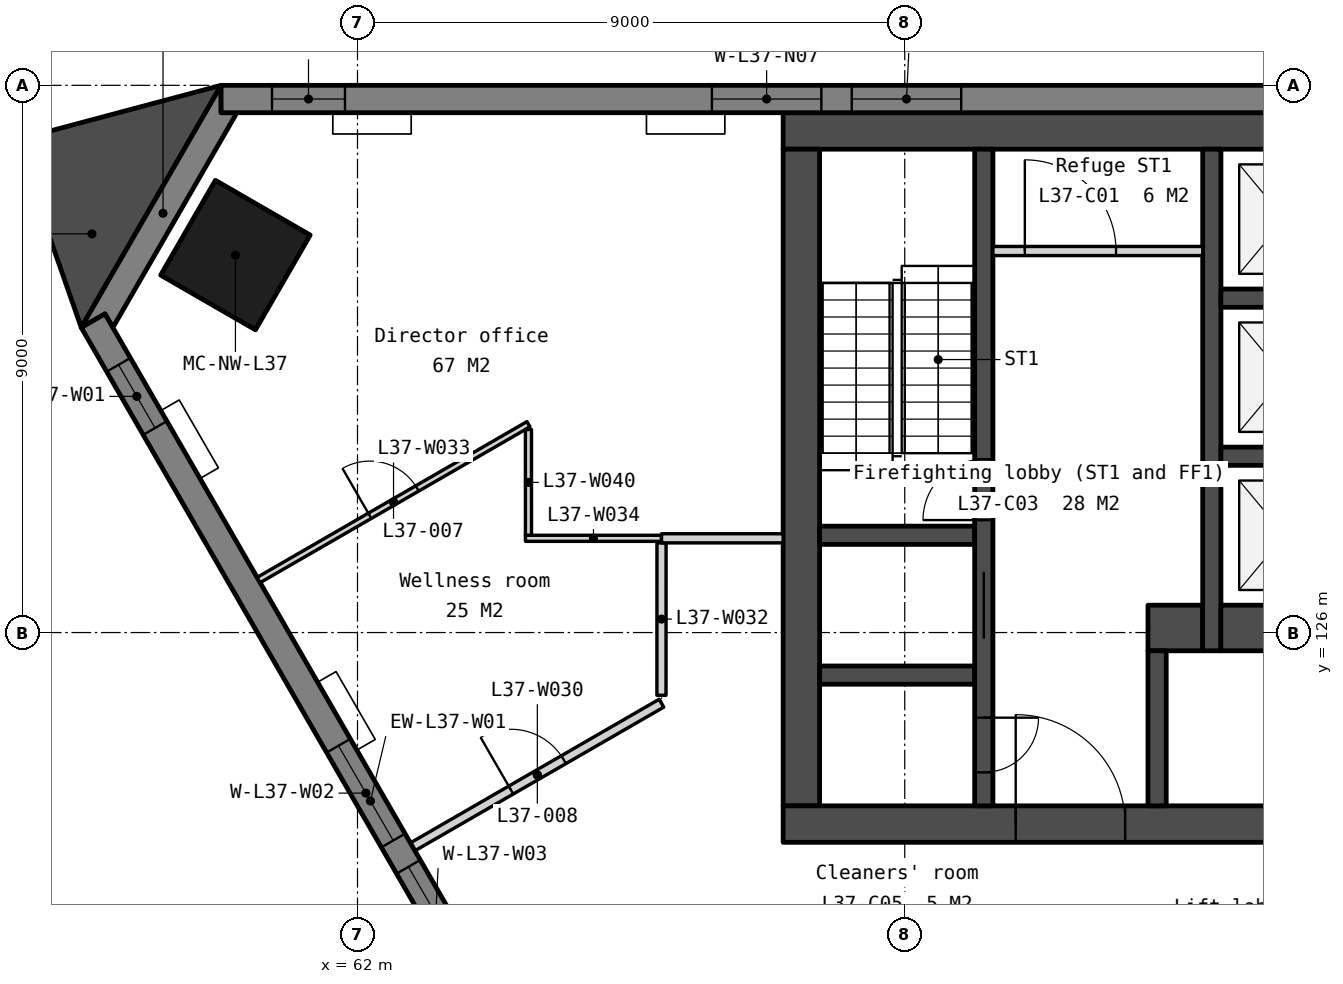
"""IFC4 building model, lengths in metres.
Left out: names, types, materials, properties, quantities, classifications, styles, units other than length and angle.
Written with IfcOpenShell. Run it as: python <this file> out.ifc"""

import sys

from ifc_helpers import new_model, si_unit, direction, frame, frame_2d, origin, origin_2d, place, context, subcontext, project, spatial, polyline, rectangle, outline, extrude, element, fill, save


model = new_model("IFC4")
c1 = context("Model", 3, precision=1e-05, world=origin(), true_north=direction((0.0, 1.0)))
c2 = subcontext(c1, "Body", "Model", "MODEL_VIEW")
j1 = project(units=[si_unit("LENGTHUNIT", "METRE"), si_unit("PLANEANGLEUNIT", "RADIAN")], contexts=[c1])
p1 = place(None, origin())
s1 = spatial("IfcSite", under=j1, at=p1, CompositionType="ELEMENT")
p2 = place(p1, origin())
s2 = spatial("IfcBuilding", under=s1, at=p2, CompositionType="ELEMENT")
p3 = place(p2, frame((0.0, 0.0, 148.1)))
s3 = spatial("IfcBuildingStorey", under=s2, at=p3, CompositionType="ELEMENT", Elevation=148.1)
p4 = place(p3, frame((59.993, 132.208, 0.0), z_axis=(0.0, 0.0, 1.0), x_axis=(-0.5, -0.866025403784, 0.0)))
e1 = element("IfcColumn", 1, at=p4, inside=s3, PredefinedType="COLUMN", context=c2, shape_type="SweptSolid", body=[
    extrude(rectangle(XDim=1.8, YDim=1.8, at=origin_2d()), origin(), (0.0, 0.0, 1.0), 3.9),
])
p5 = place(p3, frame((69.0, 134.25, 0.0), z_axis=(0.0, 0.0, 1.0), x_axis=(1.0, 0.0, 0.0)))
e2 = element("IfcWall", 2, at=p5, inside=s3, PredefinedType="SOLIDWALL", context=c2, shape_type="SweptSolid", body=[
    extrude(rectangle(XDim=22.0, YDim=0.6, at=frame_2d((11.0, 0.0))), origin(), (0.0, 0.0, 1.0), 3.75),
])
p6 = place(p3, frame((69.3, 133.95, 0.0), z_axis=(0.0, 0.0, 1.0), x_axis=(0.0, -1.0, 0.0)))
e3 = element("IfcWall", 3, at=p6, inside=s3, PredefinedType="SOLIDWALL", context=c2, shape_type="SweptSolid", body=[
    extrude(rectangle(XDim=10.8, YDim=0.6, at=frame_2d((5.4, 0.0))), origin(), (0.0, 0.0, 1.0), 3.75),
])
p7 = place(p3, frame((69.0, 122.85, 0.0), z_axis=(0.0, 0.0, 1.0), x_axis=(1.0, 0.0, 0.0)))
e4 = element("IfcWall", 4, at=p7, inside=s3, PredefinedType="SOLIDWALL", context=c2, shape_type="SweptSolid", body=[
    extrude(rectangle(XDim=22.0, YDim=0.6, at=frame_2d((11.0, 0.0))), origin(), (0.0, 0.0, 1.0), 3.75),
])
p8 = place(p7, frame((16.375, 0.0, 0.0)))
e5 = element("IfcOpeningElement", 5, at=p8, cuts=e4, PredefinedType="OPENING", context=c2, shape_type="SweptSolid", body=[
    extrude(rectangle(XDim=1.8, YDim=2.1, at=frame_2d((0.9, 1.05))), frame((0.0, 0.31, 0.0), z_axis=(0.0, -1.0, 0.0), x_axis=(1.0, 0.0, 0.0)), (0.0, 0.0, 1.0), 0.62),
])
p9 = place(p7, frame((3.825, 0.0, 0.0)))
e6 = element("IfcOpeningElement", 6, at=p9, cuts=e4, PredefinedType="OPENING", context=c2, shape_type="SweptSolid", body=[
    extrude(rectangle(XDim=1.8, YDim=2.1, at=frame_2d((0.9, 1.05))), frame((0.0, 0.31, 0.0), z_axis=(0.0, -1.0, 0.0), x_axis=(1.0, 0.0, 0.0)), (0.0, 0.0, 1.0), 0.62),
])
p10 = place(p7, frame((12.85, 0.0, 0.0)))
e7 = element("IfcOpeningElement", 7, at=p10, cuts=e4, PredefinedType="OPENING", context=c2, shape_type="SweptSolid", body=[
    extrude(rectangle(XDim=1.5, YDim=2.1, at=frame_2d((0.75, 1.05))), frame((0.0, 0.31, 0.0), z_axis=(0.0, -1.0, 0.0), x_axis=(1.0, 0.0, 0.0)), (0.0, 0.0, 1.0), 0.62),
])
for number, where, z_axis, x_axis in (
    (8, (69.6, 127.6, 0.0), (0.0, 0.0, 1.0), (1.0, 0.0, 0.0)),
    (9, (69.6, 125.3, 0.0), (0.0, 0.0, 1.0), (1.0, 0.0, 0.0)),
):
    element("IfcWall", number, at=place(p3, frame(where, z_axis=z_axis, x_axis=x_axis)), inside=s3, PredefinedType="SOLIDWALL", context=c2, shape_type="SweptSolid", body=[
        extrude(rectangle(XDim=2.55, YDim=0.3, at=frame_2d((1.275, 0.0))), origin(), (0.0, 0.0, 1.0), 3.75),
    ])
p11 = place(p3, frame((72.3, 133.95, 0.0), z_axis=(0.0, 0.0, 1.0), x_axis=(0.0, -1.0, 0.0)))
e10 = element("IfcWall", 10, at=p11, inside=s3, PredefinedType="SOLIDWALL", context=c2, shape_type="SweptSolid", body=[
    extrude(rectangle(XDim=10.8, YDim=0.3, at=frame_2d((5.4, 0.0))), origin(), (0.0, 0.0, 1.0), 3.75),
])
p12 = place(p11, frame((6.95, 0.0, 0.0)))
e11 = element("IfcOpeningElement", 11, at=p12, cuts=e10, PredefinedType="OPENING", context=c2, shape_type="SweptSolid", body=[
    extrude(rectangle(XDim=1.1, YDim=2.1, at=frame_2d((0.55, 1.05))), frame((0.0, 0.16, 0.0), z_axis=(0.0, -1.0, 0.0), x_axis=(1.0, 0.0, 0.0)), (0.0, 0.0, 1.0), 0.32),
])
p13 = place(p11, frame((9.35, 0.0, 0.0)))
e12 = element("IfcOpeningElement", 12, at=p13, cuts=e10, PredefinedType="OPENING", context=c2, shape_type="SweptSolid", body=[
    extrude(rectangle(XDim=0.9, YDim=2.1, at=frame_2d((0.45, 1.05))), frame((0.0, 0.16, 0.0), z_axis=(0.0, -1.0, 0.0), x_axis=(1.0, 0.0, 0.0)), (0.0, 0.0, 1.0), 0.32),
])
p14 = place(p11, frame((5.1, 0.0, 0.0)))
e13 = element("IfcOpeningElement", 13, at=p14, cuts=e10, PredefinedType="OPENING", context=c2, shape_type="SweptSolid", body=[
    extrude(rectangle(XDim=1.0, YDim=2.1, at=frame_2d((0.5, 1.05))), frame((0.0, 0.16, 0.0), z_axis=(0.0, -1.0, 0.0), x_axis=(1.0, 0.0, 0.0)), (0.0, 0.0, 1.0), 0.32),
])
p15 = place(p3, frame((72.45, 132.275, 0.0), z_axis=(0.0, 0.0, 1.0), x_axis=(1.0, 0.0, 0.0)))
e14 = element("IfcWall", 14, at=p15, inside=s3, PredefinedType="PARTITIONING", context=c2, shape_type="SweptSolid", body=[
    extrude(rectangle(XDim=3.45, YDim=0.15, at=frame_2d((1.725, 0.0))), origin(), (0.0, 0.0, 1.0), 3.75),
])
p16 = place(p15, frame((0.525, 0.0, 0.0)))
e15 = element("IfcOpeningElement", 15, at=p16, cuts=e14, PredefinedType="OPENING", context=c2, shape_type="SweptSolid", body=[
    extrude(rectangle(XDim=1.5, YDim=2.1, at=frame_2d((0.75, 1.05))), frame((0.0, 0.085, 0.0), z_axis=(0.0, -1.0, 0.0), x_axis=(1.0, 0.0, 0.0)), (0.0, 0.0, 1.0), 0.17),
])
p17 = place(p3, frame((75.0, 126.075, 0.0), z_axis=(0.0, 0.0, 1.0), x_axis=(1.0, 0.0, 0.0)))
e16 = element("IfcWall", 16, at=p17, inside=s3, PredefinedType="SOLIDWALL", context=c2, shape_type="SweptSolid", body=[
    extrude(rectangle(XDim=0.9, YDim=0.75, at=frame_2d((0.45, 0.0))), origin(), (0.0, 0.0, 1.0), 3.75),
])
p18 = place(p3, frame((75.15, 125.7, 0.0), z_axis=(0.0, 0.0, 1.0), x_axis=(0.0, -1.0, 0.0)))
e17 = element("IfcWall", 17, at=p18, inside=s3, PredefinedType="SOLIDWALL", context=c2, shape_type="SweptSolid", body=[
    extrude(rectangle(XDim=2.55, YDim=0.3, at=frame_2d((1.275, 0.0))), origin(), (0.0, 0.0, 1.0), 3.75),
])
p19 = place(p3, frame((76.05, 133.95, 0.0), z_axis=(0.0, 0.0, 1.0), x_axis=(0.0, -1.0, 0.0)))
e18 = element("IfcWall", 18, at=p19, inside=s3, PredefinedType="SOLIDWALL", context=c2, shape_type="SweptSolid", body=[
    extrude(rectangle(XDim=8.25, YDim=0.3, at=frame_2d((4.125, 0.0))), origin(), (0.0, 0.0, 1.0), 3.75),
])
for number, where, z_axis, x_axis in (
    (19, (76.2, 131.5, 0.0), (0.0, 0.0, 1.0), (1.0, 0.0, 0.0)),
    (20, (76.2, 128.9, 0.0), (0.0, 0.0, 1.0), (1.0, 0.0, 0.0)),
):
    element("IfcWall", number, at=place(p3, frame(where, z_axis=z_axis, x_axis=x_axis)), inside=s3, PredefinedType="SOLIDWALL", context=c2, shape_type="SweptSolid", body=[
        extrude(rectangle(XDim=2.1, YDim=0.3, at=frame_2d((1.05, 0.0))), origin(), (0.0, 0.0, 1.0), 3.75),
    ])
p20 = place(p3, frame((76.2, 126.075, 0.0), z_axis=(0.0, 0.0, 1.0), x_axis=(1.0, 0.0, 0.0)))
e21 = element("IfcWall", 21, at=p20, inside=s3, PredefinedType="SOLIDWALL", context=c2, shape_type="SweptSolid", body=[
    extrude(rectangle(XDim=2.1, YDim=0.75, at=frame_2d((1.05, 0.0))), origin(), (0.0, 0.0, 1.0), 3.75),
])
p21 = place(p3, frame((0.0, 0.0, -0.15)))
e22 = element("IfcWall", 22, at=p21, inside=s3, PredefinedType="SOLIDWALL", context=c2, shape_type="SweptSolid", body=[
    extrude(outline(polyline([(59.757, 135.0), (59.757, 134.55), (60.017, 134.55), (57.977, 131.016), (57.847, 131.241), (57.457, 131.016), (59.757, 135.0)])), origin(), (0.0, 0.0, 1.0), 3.9),
])
p22 = place(p3, frame((100.243, 134.775, -0.15), z_axis=(0.0, 0.0, 1.0), x_axis=(-1.0, 0.0, 0.0)))
e23 = element("IfcWall", 23, at=p22, inside=s3, PredefinedType="SOLIDWALL", context=c2, shape_type="SweptSolid", body=[
    extrude(outline(polyline([(40.486, 0.0), (40.486, 3.9), (0.0, 3.9), (0.0, 0.0), (40.486, 0.0)])), frame((0.0, 0.225, 0.0), z_axis=(0.0, -1.0, 0.0), x_axis=(1.0, 0.0, 0.0)), (0.0, 0.0, 1.0), 0.45),
])
p23 = place(p22, frame((0.837, 0.0, 0.95)))
e24 = element("IfcOpeningElement", 24, at=p23, cuts=e23, PredefinedType="OPENING", context=c2, shape_type="SweptSolid", body=[
    extrude(rectangle(XDim=1.2, YDim=2.2, at=frame_2d((0.6, 1.1))), frame((0.0, 0.235, 0.0), z_axis=(0.0, -1.0, 0.0), x_axis=(1.0, 0.0, 0.0)), (0.0, 0.0, 1.0), 0.47),
])
p24 = place(p22, frame((8.072, 0.0, 0.95)))
e25 = element("IfcOpeningElement", 25, at=p24, cuts=e23, PredefinedType="OPENING", context=c2, shape_type="SweptSolid", body=[
    extrude(rectangle(XDim=1.8, YDim=2.2, at=frame_2d((0.9, 1.1))), frame((0.0, 0.235, 0.0), z_axis=(0.0, -1.0, 0.0), x_axis=(1.0, 0.0, 0.0)), (0.0, 0.0, 1.0), 0.47),
])
p25 = place(p22, frame((10.372, 0.0, 0.95)))
e26 = element("IfcOpeningElement", 26, at=p25, cuts=e23, PredefinedType="OPENING", context=c2, shape_type="SweptSolid", body=[
    extrude(rectangle(XDim=1.8, YDim=2.2, at=frame_2d((0.9, 1.1))), frame((0.0, 0.235, 0.0), z_axis=(0.0, -1.0, 0.0), x_axis=(1.0, 0.0, 0.0)), (0.0, 0.0, 1.0), 0.47),
])
p26 = place(p22, frame((18.193, 0.0, 0.95)))
e27 = element("IfcOpeningElement", 27, at=p26, cuts=e23, PredefinedType="OPENING", context=c2, shape_type="SweptSolid", body=[
    extrude(rectangle(XDim=1.8, YDim=2.2, at=frame_2d((0.9, 1.1))), frame((0.0, 0.235, 0.0), z_axis=(0.0, -1.0, 0.0), x_axis=(1.0, 0.0, 0.0)), (0.0, 0.0, 1.0), 0.47),
])
p27 = place(p22, frame((20.493, 0.0, 0.95)))
e28 = element("IfcOpeningElement", 28, at=p27, cuts=e23, PredefinedType="OPENING", context=c2, shape_type="SweptSolid", body=[
    extrude(rectangle(XDim=1.8, YDim=2.2, at=frame_2d((0.9, 1.1))), frame((0.0, 0.235, 0.0), z_axis=(0.0, -1.0, 0.0), x_axis=(1.0, 0.0, 0.0)), (0.0, 0.0, 1.0), 0.47),
])
p28 = place(p22, frame((28.315, 0.0, 0.95)))
e29 = element("IfcOpeningElement", 29, at=p28, cuts=e23, PredefinedType="OPENING", context=c2, shape_type="SweptSolid", body=[
    extrude(rectangle(XDim=1.8, YDim=2.2, at=frame_2d((0.9, 1.1))), frame((0.0, 0.235, 0.0), z_axis=(0.0, -1.0, 0.0), x_axis=(1.0, 0.0, 0.0)), (0.0, 0.0, 1.0), 0.47),
])
p29 = place(p22, frame((30.615, 0.0, 0.95)))
e30 = element("IfcOpeningElement", 30, at=p29, cuts=e23, PredefinedType="OPENING", context=c2, shape_type="SweptSolid", body=[
    extrude(rectangle(XDim=1.8, YDim=2.2, at=frame_2d((0.9, 1.1))), frame((0.0, 0.235, 0.0), z_axis=(0.0, -1.0, 0.0), x_axis=(1.0, 0.0, 0.0)), (0.0, 0.0, 1.0), 0.47),
])
p30 = place(p22, frame((38.449, 0.0, 0.95)))
e31 = element("IfcOpeningElement", 31, at=p30, cuts=e23, PredefinedType="OPENING", context=c2, shape_type="SweptSolid", body=[
    extrude(rectangle(XDim=1.2, YDim=2.2, at=frame_2d((0.6, 1.1))), frame((0.0, 0.235, 0.0), z_axis=(0.0, -1.0, 0.0), x_axis=(1.0, 0.0, 0.0)), (0.0, 0.0, 1.0), 0.47),
])
p31 = place(p3, frame((57.652, 131.129, -0.15), z_axis=(0.0, 0.0, 1.0), x_axis=(0.50000511266, -0.866022451969, 0.0)))
e32 = element("IfcWall", 32, at=p31, inside=s3, PredefinedType="SOLIDWALL", context=c2, shape_type="SweptSolid", body=[
    extrude(outline(polyline([(0.0, 0.0), (0.0, 3.9), (18.243, 3.9), (18.243, 0.0), (0.0, 0.0)])), frame((0.0, 0.225, 0.0), z_axis=(0.0, -1.0, 0.0), x_axis=(1.0, 0.0, 0.0)), (0.0, 0.0, 1.0), 0.45),
])
p32 = place(p31, frame((0.837, 0.0, 0.95)))
e33 = element("IfcOpeningElement", 33, at=p32, cuts=e32, PredefinedType="OPENING", context=c2, shape_type="SweptSolid", body=[
    extrude(rectangle(XDim=1.2, YDim=2.2, at=frame_2d((0.6, 1.1))), frame((0.0, 0.235, 0.0), z_axis=(0.0, -1.0, 0.0), x_axis=(1.0, 0.0, 0.0)), (0.0, 0.0, 1.0), 0.47),
])
p33 = place(p31, frame((8.072, 0.0, 0.95)))
e34 = element("IfcOpeningElement", 34, at=p33, cuts=e32, PredefinedType="OPENING", context=c2, shape_type="SweptSolid", body=[
    extrude(rectangle(XDim=1.8, YDim=2.2, at=frame_2d((0.9, 1.1))), frame((0.0, 0.235, 0.0), z_axis=(0.0, -1.0, 0.0), x_axis=(1.0, 0.0, 0.0)), (0.0, 0.0, 1.0), 0.47),
])
p34 = place(p31, frame((10.372, 0.0, 0.95)))
e35 = element("IfcOpeningElement", 35, at=p34, cuts=e32, PredefinedType="OPENING", context=c2, shape_type="SweptSolid", body=[
    extrude(rectangle(XDim=1.8, YDim=2.2, at=frame_2d((0.9, 1.1))), frame((0.0, 0.235, 0.0), z_axis=(0.0, -1.0, 0.0), x_axis=(1.0, 0.0, 0.0)), (0.0, 0.0, 1.0), 0.47),
])
p35 = place(p3, frame((0.0, 0.0, -0.15)))
e36 = element("IfcWall", 36, at=p35, inside=s3, PredefinedType="SOLIDWALL", context=c2, shape_type="SweptSolid", body=[
    extrude(outline(polyline([(59.757, 135.0), (56.38, 134.099), (57.457, 131.016), (59.757, 135.0)])), origin(), (0.0, 0.0, 1.0), 3.9),
])
p36 = place(p3, frame((62.916, 122.481, 0.0), z_axis=(0.0, 0.0, 1.0), x_axis=(0.866016566931, 0.500015305566, 0.0)))
e37 = element("IfcWall", 37, at=p36, inside=s3, PredefinedType="PARTITIONING", context=c2, shape_type="SweptSolid", body=[
    extrude(rectangle(XDim=4.715, YDim=0.15, at=frame_2d((2.357, 0.0))), origin(), (0.0, 0.0, 1.0), 3.75),
])
p37 = place(p36, frame((1.857, 0.0, 0.0)))
e38 = element("IfcOpeningElement", 38, at=p37, cuts=e37, PredefinedType="OPENING", context=c2, shape_type="SweptSolid", body=[
    extrude(rectangle(XDim=1.0, YDim=2.1, at=frame_2d((0.5, 1.05))), frame((0.0, 0.085, 0.0), z_axis=(0.0, -1.0, 0.0), x_axis=(1.0, 0.0, 0.0)), (0.0, 0.0, 1.0), 0.17),
])
p38 = place(p3, frame((66.999, 124.968, 0.0), z_axis=(0.0, 0.0, 1.0), x_axis=(0.000389559768, 0.999999924122, 0.0)))
e39 = element("IfcWall", 39, at=p38, inside=s3, PredefinedType="PARTITIONING", context=c2, shape_type="SweptSolid", body=[
    extrude(rectangle(XDim=2.507, YDim=0.15, at=frame_2d((1.253, 0.0))), origin(), (0.0, 0.0, 1.0), 3.75),
])
p39 = place(p3, frame((60.374, 126.864, 0.0), z_axis=(0.0, 0.0, 1.0), x_axis=(0.866023722158, 0.50000291265, 0.0)))
e40 = element("IfcWall", 40, at=p39, inside=s3, PredefinedType="PARTITIONING", context=c2, shape_type="SweptSolid", body=[
    extrude(rectangle(XDim=5.124, YDim=0.1, at=frame_2d((2.562, 0.0))), origin(), (0.0, 0.0, 1.0), 3.75),
])
p40 = place(p39, frame((2.112, 0.0, 0.0)))
e41 = element("IfcOpeningElement", 41, at=p40, cuts=e40, PredefinedType="OPENING", context=c2, shape_type="SweptSolid", body=[
    extrude(rectangle(XDim=0.9, YDim=2.1, at=frame_2d((0.45, 1.05))), frame((0.0, 0.06, 0.0), z_axis=(0.0, -1.0, 0.0), x_axis=(1.0, 0.0, 0.0)), (0.0, 0.0, 1.0), 0.12),
])
p41 = place(p3, frame((64.762, 127.55, 0.0), z_axis=(0.0, 0.0, 1.0), x_axis=(1.0, 0.0, 0.0)))
e42 = element("IfcWall", 42, at=p41, inside=s3, PredefinedType="PARTITIONING", context=c2, shape_type="SweptSolid", body=[
    extrude(rectangle(XDim=2.238, YDim=0.1, at=frame_2d((1.119, 0.0))), origin(), (0.0, 0.0, 1.0), 3.75),
])
p42 = place(p3, frame((67.0, 127.55, 0.0), z_axis=(0.0, 0.0, 1.0), x_axis=(1.0, 0.0, 0.0)))
e43 = element("IfcWall", 43, at=p42, inside=s3, PredefinedType="PARTITIONING", context=c2, shape_type="SweptSolid", body=[
    extrude(rectangle(XDim=2.0, YDim=0.15, at=frame_2d((1.0, 0.0))), origin(), (0.0, 0.0, 1.0), 3.75),
])
p43 = place(p3, frame((64.812, 127.6, 0.0), z_axis=(0.0, 0.0, 1.0), x_axis=(-0.000280741146, 0.999999960592, 0.0)))
e44 = element("IfcWall", 44, at=p43, inside=s3, PredefinedType="PARTITIONING", context=c2, shape_type="SweptSolid", body=[
    extrude(rectangle(XDim=1.739, YDim=0.1, at=frame_2d((0.87, 0.0))), origin(), (0.0, 0.0, 1.0), 3.75),
])
p44 = place(p12, origin())
e45 = element("IfcDoor", 45, at=p44, inside=s3, OperationType="SLIDING_TO_LEFT", PredefinedType="DOOR", context=c2, shape_type="SweptSolid", body=[
    extrude(rectangle(XDim=1.1, YDim=2.1, at=frame_2d((0.55, 1.05))), frame((0.0, 0.025, 0.0), z_axis=(0.0, -1.0, 0.0), x_axis=(1.0, 0.0, 0.0)), (0.0, 0.0, 1.0), 0.05),
])
fill(e11, e45)
p45 = place(p9, origin())
e46 = element("IfcDoor", 46, at=p45, inside=s3, OperationType="DOUBLE_DOOR_DOUBLE_SWING", PredefinedType="DOOR", context=c2, shape_type="SweptSolid", body=[
    extrude(rectangle(XDim=1.8, YDim=2.1, at=frame_2d((0.9, 1.05))), frame((0.0, 0.025, 0.0), z_axis=(0.0, -1.0, 0.0), x_axis=(1.0, 0.0, 0.0)), (0.0, 0.0, 1.0), 0.05),
])
fill(e6, e46)
p46 = place(p16, origin())
e47 = element("IfcDoor", 47, at=p46, inside=s3, OperationType="DOUBLE_DOOR_DOUBLE_SWING", PredefinedType="DOOR", context=c2, shape_type="SweptSolid", body=[
    extrude(rectangle(XDim=1.5, YDim=2.1, at=frame_2d((0.75, 1.05))), frame((0.0, 0.025, 0.0), z_axis=(0.0, -1.0, 0.0), x_axis=(1.0, 0.0, 0.0)), (0.0, 0.0, 1.0), 0.05),
])
fill(e15, e47)
p47 = place(p13, origin())
e48 = element("IfcDoor", 48, at=p47, inside=s3, OperationType="SINGLE_SWING_LEFT", PredefinedType="DOOR", context=c2, shape_type="SweptSolid", body=[
    extrude(rectangle(XDim=0.9, YDim=2.1, at=frame_2d((0.45, 1.05))), frame((0.0, 0.025, 0.0), z_axis=(0.0, -1.0, 0.0), x_axis=(1.0, 0.0, 0.0)), (0.0, 0.0, 1.0), 0.05),
])
fill(e12, e48)
p48 = place(p14, origin())
e49 = element("IfcDoor", 49, at=p48, inside=s3, OperationType="SINGLE_SWING_RIGHT", PredefinedType="DOOR", context=c2, shape_type="SweptSolid", body=[
    extrude(rectangle(XDim=1.0, YDim=2.1, at=frame_2d((0.5, 1.05))), frame((0.0, 0.025, 0.0), z_axis=(0.0, -1.0, 0.0), x_axis=(1.0, 0.0, 0.0)), (0.0, 0.0, 1.0), 0.05),
])
fill(e13, e49)
p49 = place(p28, origin())
e50 = element("IfcWindow", 50, at=p49, inside=s3, PartitioningType="SINGLE_PANEL", PredefinedType="WINDOW", context=c2, shape_type="SweptSolid", body=[
    extrude(rectangle(XDim=1.8, YDim=2.2, at=frame_2d((0.9, 1.1))), frame((0.0, 0.03, 0.0), z_axis=(0.0, -1.0, 0.0), x_axis=(1.0, 0.0, 0.0)), (0.0, 0.0, 1.0), 0.06),
])
fill(e29, e50)
p50 = place(p29, origin())
e51 = element("IfcWindow", 51, at=p50, inside=s3, PartitioningType="SINGLE_PANEL", PredefinedType="WINDOW", context=c2, shape_type="SweptSolid", body=[
    extrude(rectangle(XDim=1.8, YDim=2.2, at=frame_2d((0.9, 1.1))), frame((0.0, 0.03, 0.0), z_axis=(0.0, -1.0, 0.0), x_axis=(1.0, 0.0, 0.0)), (0.0, 0.0, 1.0), 0.06),
])
fill(e30, e51)
p51 = place(p30, origin())
e52 = element("IfcWindow", 52, at=p51, inside=s3, PartitioningType="SINGLE_PANEL", PredefinedType="WINDOW", context=c2, shape_type="SweptSolid", body=[
    extrude(rectangle(XDim=1.2, YDim=2.2, at=frame_2d((0.6, 1.1))), frame((0.0, 0.03, 0.0), z_axis=(0.0, -1.0, 0.0), x_axis=(1.0, 0.0, 0.0)), (0.0, 0.0, 1.0), 0.06),
])
fill(e31, e52)
p52 = place(p32, origin())
e53 = element("IfcWindow", 53, at=p52, inside=s3, PartitioningType="SINGLE_PANEL", PredefinedType="WINDOW", context=c2, shape_type="SweptSolid", body=[
    extrude(rectangle(XDim=1.2, YDim=2.2, at=frame_2d((0.6, 1.1))), frame((0.0, 0.03, 0.0), z_axis=(0.0, -1.0, 0.0), x_axis=(1.0, 0.0, 0.0)), (0.0, 0.0, 1.0), 0.06),
])
fill(e33, e53)
p53 = place(p33, origin())
e54 = element("IfcWindow", 54, at=p53, inside=s3, PartitioningType="SINGLE_PANEL", PredefinedType="WINDOW", context=c2, shape_type="SweptSolid", body=[
    extrude(rectangle(XDim=1.8, YDim=2.2, at=frame_2d((0.9, 1.1))), frame((0.0, 0.03, 0.0), z_axis=(0.0, -1.0, 0.0), x_axis=(1.0, 0.0, 0.0)), (0.0, 0.0, 1.0), 0.06),
])
fill(e34, e54)
p54 = place(p34, origin())
e55 = element("IfcWindow", 55, at=p54, inside=s3, PartitioningType="SINGLE_PANEL", PredefinedType="WINDOW", context=c2, shape_type="SweptSolid", body=[
    extrude(rectangle(XDim=1.8, YDim=2.2, at=frame_2d((0.9, 1.1))), frame((0.0, 0.03, 0.0), z_axis=(0.0, -1.0, 0.0), x_axis=(1.0, 0.0, 0.0)), (0.0, 0.0, 1.0), 0.06),
])
fill(e35, e55)
p55 = place(p40, origin())
e56 = element("IfcDoor", 56, at=p55, inside=s3, OperationType="SINGLE_SWING_LEFT", PredefinedType="DOOR", context=c2, shape_type="SweptSolid", body=[
    extrude(rectangle(XDim=0.9, YDim=2.1, at=frame_2d((0.45, 1.05))), frame((0.0, 0.025, 0.0), z_axis=(0.0, -1.0, 0.0), x_axis=(1.0, 0.0, 0.0)), (0.0, 0.0, 1.0), 0.05),
])
fill(e41, e56)
p56 = place(p37, origin())
e57 = element("IfcDoor", 57, at=p56, inside=s3, OperationType="SINGLE_SWING_LEFT", PredefinedType="DOOR", context=c2, shape_type="SweptSolid", body=[
    extrude(rectangle(XDim=1.0, YDim=2.1, at=frame_2d((0.5, 1.05))), frame((0.0, 0.025, 0.0), z_axis=(0.0, -1.0, 0.0), x_axis=(1.0, 0.0, 0.0)), (0.0, 0.0, 1.0), 0.05),
])
fill(e38, e57)
save(model, sys.argv[1])
